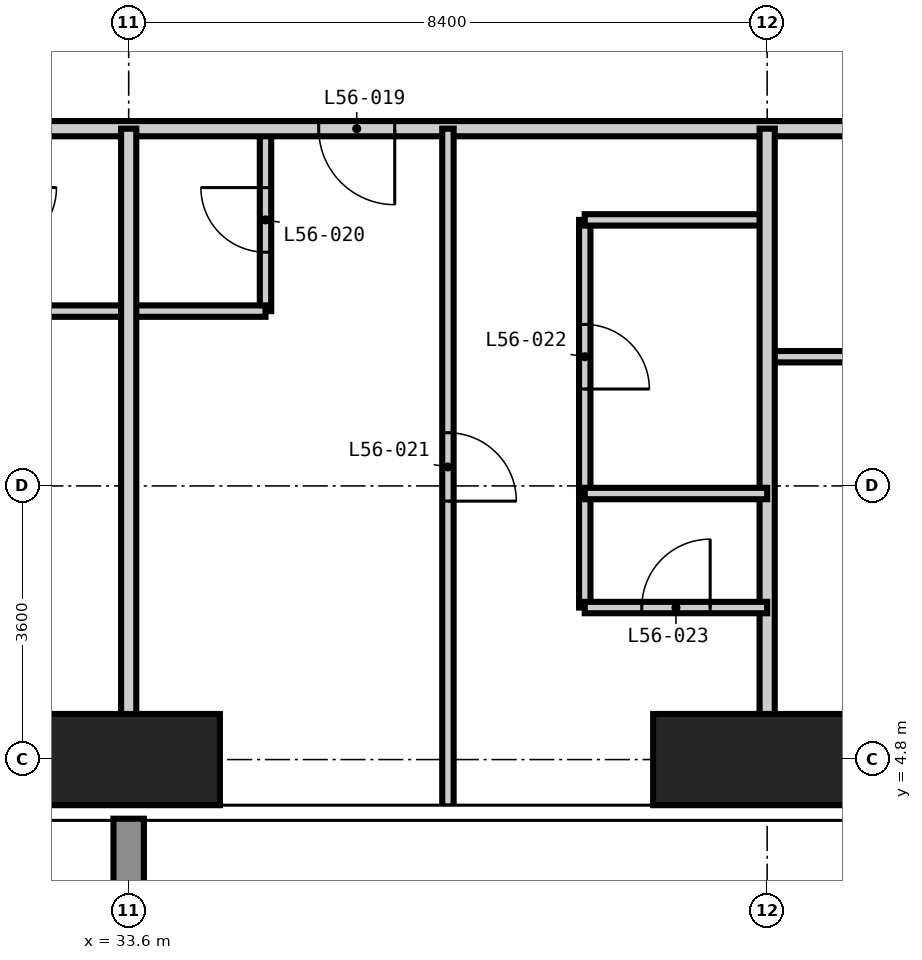
"""IFC4 building model, lengths in metres.
Left out: names, types, materials, properties, quantities, classifications, styles, units other than length and angle.
Written with IfcOpenShell. Run it as: python <this file> out.ifc"""

import sys

from ifc_helpers import new_model, si_unit, direction, frame, frame_2d, origin, origin_2d, place, context, subcontext, project, spatial, rectangle, extrude, element, fill, save


model = new_model("IFC4")
c1 = context("Model", 3, precision=1e-05, world=origin(), true_north=direction((0.0, 1.0)))
c2 = subcontext(c1, "Body", "Model", "MODEL_VIEW")
j1 = project(units=[si_unit("LENGTHUNIT", "METRE"), si_unit("PLANEANGLEUNIT", "RADIAN")], contexts=[c1])
p1 = place(None, origin())
s1 = spatial("IfcSite", under=j1, at=p1, CompositionType="ELEMENT")
p2 = place(p1, origin())
s2 = spatial("IfcBuilding", under=s1, at=p2, CompositionType="ELEMENT")
p3 = place(p2, frame((0.0, 0.0, 216.6)))
s3 = spatial("IfcBuildingStorey", under=s2, at=p3, CompositionType="ELEMENT", Elevation=216.6)
p4 = place(p3, frame((33.6, 4.8, -0.35), z_axis=(0.0, 0.0, 1.0), x_axis=(1.0, 0.0, 0.0)))
e1 = element("IfcColumn", 1, at=p4, inside=s3, PredefinedType="COLUMN", context=c2, shape_type="SweptSolid", body=[
    extrude(rectangle(XDim=2.4, YDim=1.2, at=origin_2d()), origin(), (0.0, 0.0, 1.0), 3.55),
])
p5 = place(p3, frame((42.0, 4.8, -0.35), z_axis=(0.0, 0.0, 1.0), x_axis=(1.0, 0.0, 0.0)))
e2 = element("IfcColumn", 2, at=p5, inside=s3, PredefinedType="COLUMN", context=c2, shape_type="SweptSolid", body=[
    extrude(rectangle(XDim=3.0, YDim=1.2, at=origin_2d()), origin(), (0.0, 0.0, 1.0), 3.55),
])
p6 = place(p3, frame((35.4, 10.7, 0.0), z_axis=(0.0, 0.0, 1.0), x_axis=(0.0, 1.0, 0.0)))
e3 = element("IfcWall", 3, at=p6, inside=s3, PredefinedType="PARTITIONING", context=c2, shape_type="SweptSolid", body=[
    extrude(rectangle(XDim=2.4, YDim=0.15, at=frame_2d((1.2, 0.0))), origin(), (0.0, 0.0, 1.0), 3.2),
])
p7 = place(p6, frame((0.775, 0.0, 0.0)))
e4 = element("IfcOpeningElement", 4, at=p7, cuts=e3, PredefinedType="OPENING", context=c2, shape_type="SweptSolid", body=[
    extrude(rectangle(XDim=0.85, YDim=2.1, at=frame_2d((0.425, 1.05))), frame((0.0, 0.085, 0.0), z_axis=(0.0, -1.0, 0.0), x_axis=(1.0, 0.0, 0.0)), (0.0, 0.0, 1.0), 0.17),
])
p8 = place(p3, frame((39.6, 8.3, 0.0), z_axis=(0.0, 0.0, 1.0), x_axis=(0.0, 1.0, 0.0)))
e5 = element("IfcWall", 5, at=p8, inside=s3, PredefinedType="PARTITIONING", context=c2, shape_type="SweptSolid", body=[
    extrude(rectangle(XDim=3.6, YDim=0.15, at=frame_2d((1.8, 0.0))), origin(), (0.0, 0.0, 1.0), 3.2),
])
p9 = place(p8, frame((1.375, 0.0, 0.0)))
e6 = element("IfcOpeningElement", 6, at=p9, cuts=e5, PredefinedType="OPENING", context=c2, shape_type="SweptSolid", body=[
    extrude(rectangle(XDim=0.85, YDim=2.1, at=frame_2d((0.425, 1.05))), frame((0.0, 0.085, 0.0), z_axis=(0.0, -1.0, 0.0), x_axis=(1.0, 0.0, 0.0)), (0.0, 0.0, 1.0), 0.17),
])
p10 = place(p3, frame((42.0, 10.1, 0.0), z_axis=(0.0, 0.0, 1.0), x_axis=(1.0, 0.0, 0.0)))
e7 = element("IfcWall", 7, at=p10, inside=s3, PredefinedType="PARTITIONING", context=c2, shape_type="SweptSolid", body=[
    extrude(rectangle(XDim=2.5, YDim=0.15, at=frame_2d((1.25, 0.0))), origin(), (0.0, 0.0, 1.0), 3.2),
])
p11 = place(p3, frame((31.8, 10.7, 0.0), z_axis=(0.0, 0.0, 1.0), x_axis=(1.0, 0.0, 0.0)))
e8 = element("IfcWall", 8, at=p11, inside=s3, PredefinedType="PARTITIONING", context=c2, shape_type="SweptSolid", body=[
    extrude(rectangle(XDim=3.6, YDim=0.15, at=frame_2d((1.8, 0.0))), origin(), (0.0, 0.0, 1.0), 3.2),
])
p12 = place(p3, frame((39.6, 11.9, 0.0), z_axis=(0.0, 0.0, 1.0), x_axis=(1.0, 0.0, 0.0)))
e9 = element("IfcWall", 9, at=p12, inside=s3, PredefinedType="PARTITIONING", context=c2, shape_type="SweptSolid", body=[
    extrude(rectangle(XDim=2.4, YDim=0.15, at=frame_2d((1.2, 0.0))), origin(), (0.0, 0.0, 1.0), 3.2),
])
p13 = place(p3, frame((44.5, 13.1, 0.0), z_axis=(0.0, 0.0, 1.0), x_axis=(-1.0, 0.0, 0.0)))
e10 = element("IfcWall", 10, at=p13, inside=s3, PredefinedType="PARTITIONING", context=c2, shape_type="SweptSolid", body=[
    extrude(rectangle(XDim=31.4, YDim=0.2, at=frame_2d((15.7, 0.0))), origin(), (0.0, 0.0, 1.0), 3.2),
])
p14 = place(p13, frame((24.2, 0.0, 0.0)))
e11 = element("IfcOpeningElement", 11, at=p14, cuts=e10, PredefinedType="OPENING", context=c2, shape_type="SweptSolid", body=[
    extrude(rectangle(XDim=1.0, YDim=2.2, at=frame_2d((0.5, 1.1))), frame((0.0, 0.11, 0.0), z_axis=(0.0, -1.0, 0.0), x_axis=(1.0, 0.0, 0.0)), (0.0, 0.0, 1.0), 0.22),
])
p15 = place(p13, frame((13.4, 0.0, 0.0)))
e12 = element("IfcOpeningElement", 12, at=p15, cuts=e10, PredefinedType="OPENING", context=c2, shape_type="SweptSolid", body=[
    extrude(rectangle(XDim=1.0, YDim=2.2, at=frame_2d((0.5, 1.1))), frame((0.0, 0.11, 0.0), z_axis=(0.0, -1.0, 0.0), x_axis=(1.0, 0.0, 0.0)), (0.0, 0.0, 1.0), 0.22),
])
p16 = place(p13, frame((7.4, 0.0, 0.0)))
e13 = element("IfcOpeningElement", 13, at=p16, cuts=e10, PredefinedType="OPENING", context=c2, shape_type="SweptSolid", body=[
    extrude(rectangle(XDim=1.0, YDim=2.2, at=frame_2d((0.5, 1.1))), frame((0.0, 0.11, 0.0), z_axis=(0.0, -1.0, 0.0), x_axis=(1.0, 0.0, 0.0)), (0.0, 0.0, 1.0), 0.22),
])
for number, where, z_axis, x_axis in (
    (14, (33.6, 4.182, 0.0), (0.0, 0.0, 1.0), (0.0, 1.0, 0.0)),
    (15, (42.0, 4.182, 0.0), (0.0, 0.0, 1.0), (0.0, 1.0, 0.0)),
):
    element("IfcWall", number, at=place(p3, frame(where, z_axis=z_axis, x_axis=x_axis)), inside=s3, PredefinedType="PARTITIONING", context=c2, shape_type="SweptSolid", body=[
        extrude(rectangle(XDim=8.918, YDim=0.2, at=frame_2d((4.459, 0.0))), origin(), (0.0, 0.0, 1.0), 3.2),
    ])
p17 = place(p3, frame((37.8, 4.182, 0.0), z_axis=(0.0, 0.0, 1.0), x_axis=(0.0, 1.0, 0.0)))
e16 = element("IfcWall", 16, at=p17, inside=s3, PredefinedType="PARTITIONING", context=c2, shape_type="SweptSolid", body=[
    extrude(rectangle(XDim=8.918, YDim=0.15, at=frame_2d((4.459, 0.0))), origin(), (0.0, 0.0, 1.0), 3.2),
])
p18 = place(p17, frame((4.018, 0.0, 0.0)))
e17 = element("IfcOpeningElement", 17, at=p18, cuts=e16, PredefinedType="OPENING", context=c2, shape_type="SweptSolid", body=[
    extrude(rectangle(XDim=0.9, YDim=2.1, at=frame_2d((0.45, 1.05))), frame((0.0, 0.085, 0.0), z_axis=(0.0, -1.0, 0.0), x_axis=(1.0, 0.0, 0.0)), (0.0, 0.0, 1.0), 0.17),
])
p19 = place(p3, frame((39.6, 6.8, 0.0), z_axis=(0.0, 0.0, 1.0), x_axis=(0.0, 1.0, 0.0)))
e18 = element("IfcWall", 18, at=p19, inside=s3, PredefinedType="PARTITIONING", context=c2, shape_type="SweptSolid", body=[
    extrude(rectangle(XDim=1.5, YDim=0.15, at=frame_2d((0.75, 0.0))), origin(), (0.0, 0.0, 1.0), 3.2),
])
p20 = place(p3, frame((39.6, 6.8, 0.0), z_axis=(0.0, 0.0, 1.0), x_axis=(1.0, 0.0, 0.0)))
e19 = element("IfcWall", 19, at=p20, inside=s3, PredefinedType="PARTITIONING", context=c2, shape_type="SweptSolid", body=[
    extrude(rectangle(XDim=2.4, YDim=0.15, at=frame_2d((1.2, 0.0))), origin(), (0.0, 0.0, 1.0), 3.2),
])
p21 = place(p20, frame((0.75, 0.0, 0.0)))
e20 = element("IfcOpeningElement", 20, at=p21, cuts=e19, PredefinedType="OPENING", context=c2, shape_type="SweptSolid", body=[
    extrude(rectangle(XDim=0.9, YDim=2.1, at=frame_2d((0.45, 1.05))), frame((0.0, 0.085, 0.0), z_axis=(0.0, -1.0, 0.0), x_axis=(1.0, 0.0, 0.0)), (0.0, 0.0, 1.0), 0.17),
])
p22 = place(p3, frame((39.6, 8.3, 0.0), z_axis=(0.0, 0.0, 1.0), x_axis=(1.0, 0.0, 0.0)))
e21 = element("IfcWall", 21, at=p22, inside=s3, PredefinedType="PARTITIONING", context=c2, shape_type="SweptSolid", body=[
    extrude(rectangle(XDim=2.4, YDim=0.15, at=frame_2d((1.2, 0.0))), origin(), (0.0, 0.0, 1.0), 3.2),
])
p23 = place(p16, origin())
e22 = element("IfcDoor", 22, at=p23, inside=s3, OperationType="SINGLE_SWING_LEFT", PredefinedType="DOOR", context=c2, shape_type="SweptSolid", body=[
    extrude(rectangle(XDim=1.0, YDim=2.2, at=frame_2d((0.5, 1.1))), frame((0.0, 0.025, 0.0), z_axis=(0.0, -1.0, 0.0), x_axis=(1.0, 0.0, 0.0)), (0.0, 0.0, 1.0), 0.05),
])
fill(e13, e22)
p24 = place(p7, origin())
e23 = element("IfcDoor", 23, at=p24, inside=s3, OperationType="SINGLE_SWING_RIGHT", PredefinedType="DOOR", context=c2, shape_type="SweptSolid", body=[
    extrude(rectangle(XDim=0.85, YDim=2.1, at=frame_2d((0.425, 1.05))), frame((0.0, 0.025, 0.0), z_axis=(0.0, -1.0, 0.0), x_axis=(1.0, 0.0, 0.0)), (0.0, 0.0, 1.0), 0.05),
])
fill(e4, e23)
p25 = place(p18, frame((0.9, 0.0, 0.0), z_axis=(0.0, 0.0, 1.0), x_axis=(-1.0, 0.0, 0.0)))
e24 = element("IfcDoor", 24, at=p25, inside=s3, OperationType="SINGLE_SWING_RIGHT", PredefinedType="DOOR", context=c2, shape_type="SweptSolid", body=[
    extrude(rectangle(XDim=0.9, YDim=2.1, at=frame_2d((0.45, 1.05))), frame((0.0, 0.025, 0.0), z_axis=(0.0, -1.0, 0.0), x_axis=(1.0, 0.0, 0.0)), (0.0, 0.0, 1.0), 0.05),
])
fill(e17, e24)
p26 = place(p9, frame((0.85, 0.0, 0.0), z_axis=(0.0, 0.0, 1.0), x_axis=(-1.0, 0.0, 0.0)))
e25 = element("IfcDoor", 25, at=p26, inside=s3, OperationType="SINGLE_SWING_RIGHT", PredefinedType="DOOR", context=c2, shape_type="SweptSolid", body=[
    extrude(rectangle(XDim=0.85, YDim=2.1, at=frame_2d((0.425, 1.05))), frame((0.0, 0.025, 0.0), z_axis=(0.0, -1.0, 0.0), x_axis=(1.0, 0.0, 0.0)), (0.0, 0.0, 1.0), 0.05),
])
fill(e6, e25)
p27 = place(p21, origin())
e26 = element("IfcDoor", 26, at=p27, inside=s3, OperationType="SINGLE_SWING_RIGHT", PredefinedType="DOOR", context=c2, shape_type="SweptSolid", body=[
    extrude(rectangle(XDim=0.9, YDim=2.1, at=frame_2d((0.45, 1.05))), frame((0.0, 0.025, 0.0), z_axis=(0.0, -1.0, 0.0), x_axis=(1.0, 0.0, 0.0)), (0.0, 0.0, 1.0), 0.05),
])
fill(e20, e26)
save(model, sys.argv[1])
